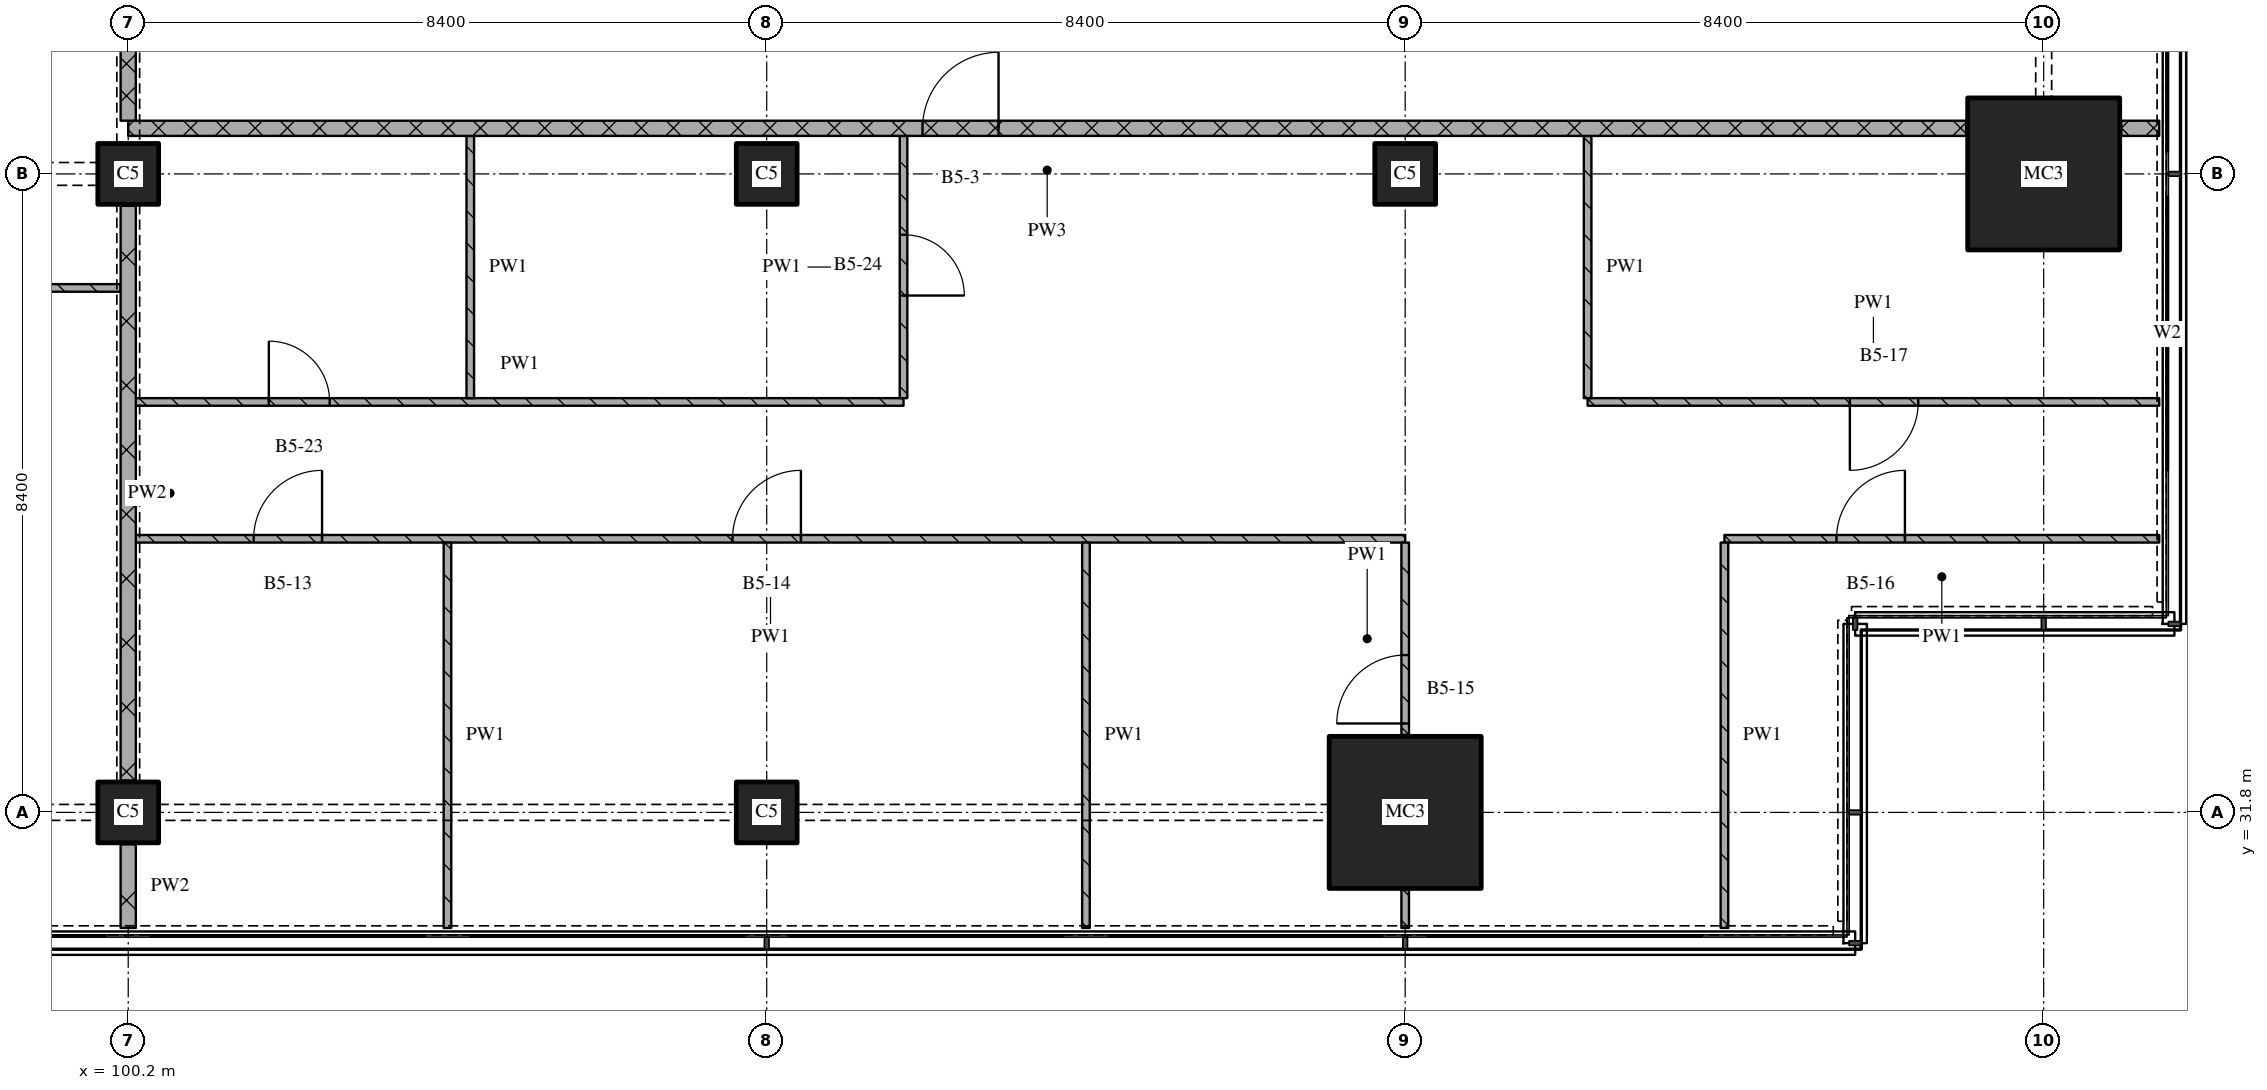
"""IFC4 building model, lengths in metres.
Left out: names, types, materials, properties, quantities, classifications, styles, units other than length and angle.
Written with IfcOpenShell. Run it as: python <this file> out.ifc"""

import sys

from ifc_helpers import new_model, si_unit, direction, frame, frame_2d, origin, origin_2d, place, context, subcontext, project, spatial, rectangle, extrude, element, fill, save


model = new_model("IFC4")
c1 = context("Model", 3, precision=1e-05, world=origin(), true_north=direction((0.0, 1.0)))
c2 = subcontext(c1, "Body", "Model", "MODEL_VIEW")
j1 = project(units=[si_unit("LENGTHUNIT", "METRE"), si_unit("PLANEANGLEUNIT", "RADIAN")], contexts=[c1])
p1 = place(None, origin())
s1 = spatial("IfcSite", under=j1, at=p1, CompositionType="ELEMENT")
p2 = place(p1, origin())
s2 = spatial("IfcBuilding", under=s1, at=p2, CompositionType="ELEMENT")
p3 = place(p2, frame((0.0, 0.0, 138.45)))
s3 = spatial("IfcBuildingStorey", under=s2, at=p3, CompositionType="ELEMENT", Elevation=138.45)
for number, where, z_axis, x_axis in (
    (1, (100.2, 31.8, 0.0), (0.0, 0.0, 1.0), (1.0, 0.0, 0.0)),
    (2, (100.2, 40.2, 0.0), (0.0, 0.0, 1.0), (1.0, 0.0, 0.0)),
    (3, (108.6, 31.8, 0.0), (0.0, 0.0, 1.0), (1.0, 0.0, 0.0)),
    (4, (108.6, 40.2, 0.0), (0.0, 0.0, 1.0), (1.0, 0.0, 0.0)),
):
    element("IfcColumn", number, at=place(p3, frame(where, z_axis=z_axis, x_axis=x_axis)), inside=s3, PredefinedType="COLUMN", context=c2, shape_type="SweptSolid", body=[
        extrude(rectangle(XDim=0.8, YDim=0.8, at=origin_2d()), origin(), (0.0, 0.0, 1.0), 3.6),
    ])
p4 = place(p3, frame((117.0, 31.8, 0.0), z_axis=(0.0, 0.0, 1.0), x_axis=(1.0, 0.0, 0.0)))
e5 = element("IfcColumn", 5, at=p4, inside=s3, PredefinedType="COLUMN", context=c2, shape_type="SweptSolid", body=[
    extrude(rectangle(XDim=2.0, YDim=2.0, at=origin_2d()), origin(), (0.0, 0.0, 1.0), 3.6),
])
p5 = place(p3, frame((117.0, 40.2, 0.0), z_axis=(0.0, 0.0, 1.0), x_axis=(1.0, 0.0, 0.0)))
e6 = element("IfcColumn", 6, at=p5, inside=s3, PredefinedType="COLUMN", context=c2, shape_type="SweptSolid", body=[
    extrude(rectangle(XDim=0.8, YDim=0.8, at=origin_2d()), origin(), (0.0, 0.0, 1.0), 3.6),
])
p6 = place(p3, frame((125.4, 40.2, 0.0), z_axis=(0.0, 0.0, 1.0), x_axis=(1.0, 0.0, 0.0)))
e7 = element("IfcColumn", 7, at=p6, inside=s3, PredefinedType="COLUMN", context=c2, shape_type="SweptSolid", body=[
    extrude(rectangle(XDim=2.0, YDim=2.0, at=origin_2d()), origin(), (0.0, 0.0, 1.0), 3.6),
])
p7 = place(p3, frame((117.0, 35.4, 0.0), z_axis=(0.0, 0.0, 1.0), x_axis=(-1.0, 0.0, 0.0)))
e8 = element("IfcWall", 8, at=p7, inside=s3, PredefinedType="PARTITIONING", context=c2, shape_type="SweptSolid", body=[
    extrude(rectangle(XDim=16.7, YDim=0.1, at=frame_2d((8.35, 0.0))), origin(), (0.0, 0.0, 1.0), 3.3),
])
p8 = place(p7, frame((7.95, 0.0, 0.0)))
e9 = element("IfcOpeningElement", 9, at=p8, cuts=e8, PredefinedType="OPENING", context=c2, shape_type="SweptSolid", body=[
    extrude(rectangle(XDim=0.9, YDim=2.1, at=frame_2d((0.45, 1.05))), frame((0.0, 0.06, 0.0), z_axis=(0.0, -1.0, 0.0), x_axis=(1.0, 0.0, 0.0)), (0.0, 0.0, 1.0), 0.12),
])
p9 = place(p7, frame((14.25, 0.0, 0.0)))
e10 = element("IfcOpeningElement", 10, at=p9, cuts=e8, PredefinedType="OPENING", context=c2, shape_type="SweptSolid", body=[
    extrude(rectangle(XDim=0.9, YDim=2.1, at=frame_2d((0.45, 1.05))), frame((0.0, 0.06, 0.0), z_axis=(0.0, -1.0, 0.0), x_axis=(1.0, 0.0, 0.0)), (0.0, 0.0, 1.0), 0.12),
])
p10 = place(p3, frame((126.92, 35.4, 0.0), z_axis=(0.0, 0.0, 1.0), x_axis=(-1.0, 0.0, 0.0)))
e11 = element("IfcWall", 11, at=p10, inside=s3, PredefinedType="PARTITIONING", context=c2, shape_type="SweptSolid", body=[
    extrude(rectangle(XDim=5.72, YDim=0.1, at=frame_2d((2.86, 0.0))), origin(), (0.0, 0.0, 1.0), 3.3),
])
p11 = place(p10, frame((3.346, 0.0, 0.0)))
e12 = element("IfcOpeningElement", 12, at=p11, cuts=e11, PredefinedType="OPENING", context=c2, shape_type="SweptSolid", body=[
    extrude(rectangle(XDim=0.9, YDim=2.1, at=frame_2d((0.45, 1.05))), frame((0.0, 0.06, 0.0), z_axis=(0.0, -1.0, 0.0), x_axis=(1.0, 0.0, 0.0)), (0.0, 0.0, 1.0), 0.12),
])
p12 = place(p3, frame((100.3, 37.2, 0.0), z_axis=(0.0, 0.0, 1.0), x_axis=(1.0, 0.0, 0.0)))
e13 = element("IfcWall", 13, at=p12, inside=s3, PredefinedType="PARTITIONING", context=c2, shape_type="SweptSolid", body=[
    extrude(rectangle(XDim=10.1, YDim=0.1, at=frame_2d((5.05, 0.0))), origin(), (0.0, 0.0, 1.0), 3.3),
])
p13 = place(p12, frame((1.75, 0.0, 0.0)))
e14 = element("IfcOpeningElement", 14, at=p13, cuts=e13, PredefinedType="OPENING", context=c2, shape_type="SweptSolid", body=[
    extrude(rectangle(XDim=0.8, YDim=2.1, at=frame_2d((0.4, 1.05))), frame((0.0, 0.06, 0.0), z_axis=(0.0, -1.0, 0.0), x_axis=(1.0, 0.0, 0.0)), (0.0, 0.0, 1.0), 0.12),
])
p14 = place(p3, frame((119.4, 37.2, 0.0), z_axis=(0.0, 0.0, 1.0), x_axis=(1.0, 0.0, 0.0)))
e15 = element("IfcWall", 15, at=p14, inside=s3, PredefinedType="PARTITIONING", context=c2, shape_type="SweptSolid", body=[
    extrude(rectangle(XDim=7.52, YDim=0.1, at=frame_2d((3.76, 0.0))), origin(), (0.0, 0.0, 1.0), 3.3),
])
p15 = place(p14, frame((3.45, 0.0, 0.0)))
e16 = element("IfcOpeningElement", 16, at=p15, cuts=e15, PredefinedType="OPENING", context=c2, shape_type="SweptSolid", body=[
    extrude(rectangle(XDim=0.9, YDim=2.1, at=frame_2d((0.45, 1.05))), frame((0.0, 0.06, 0.0), z_axis=(0.0, -1.0, 0.0), x_axis=(1.0, 0.0, 0.0)), (0.0, 0.0, 1.0), 0.12),
])
p16 = place(p3, frame((90.3, 38.7, 0.0), z_axis=(0.0, 0.0, 1.0), x_axis=(1.0, 0.0, 0.0)))
e17 = element("IfcWall", 17, at=p16, inside=s3, PredefinedType="PARTITIONING", context=c2, shape_type="SweptSolid", body=[
    extrude(rectangle(XDim=9.8, YDim=0.1, at=frame_2d((4.9, 0.0))), origin(), (0.0, 0.0, 1.0), 3.3),
])
p17 = place(p16, frame((6.8, 0.0, 0.0)))
e18 = element("IfcOpeningElement", 18, at=p17, cuts=e17, PredefinedType="OPENING", context=c2, shape_type="SweptSolid", body=[
    extrude(rectangle(XDim=0.8, YDim=2.1, at=frame_2d((0.4, 1.05))), frame((0.0, 0.06, 0.0), z_axis=(0.0, -1.0, 0.0), x_axis=(1.0, 0.0, 0.0)), (0.0, 0.0, 1.0), 0.12),
])
p18 = place(p3, frame((124.38, 40.8, 0.0), z_axis=(0.0, 0.0, 1.0), x_axis=(-1.0, 0.0, 0.0)))
e19 = element("IfcWall", 19, at=p18, inside=s3, PredefinedType="PARTITIONING", context=c2, shape_type="SweptSolid", body=[
    extrude(rectangle(XDim=24.18, YDim=0.2, at=frame_2d((12.09, 0.0))), origin(), (0.0, 0.0, 1.0), 3.3),
])
p19 = place(p18, frame((12.73, 0.0, 0.0)))
e20 = element("IfcOpeningElement", 20, at=p19, cuts=e19, PredefinedType="OPENING", context=c2, shape_type="SweptSolid", body=[
    extrude(rectangle(XDim=1.0, YDim=2.1, at=frame_2d((0.5, 1.05))), frame((0.0, 0.11, 0.0), z_axis=(0.0, -1.0, 0.0), x_axis=(1.0, 0.0, 0.0)), (0.0, 0.0, 1.0), 0.22),
])
p20 = place(p3, frame((126.42, 40.8, 0.0), z_axis=(0.0, 0.0, 1.0), x_axis=(1.0, 0.0, 0.0)))
e21 = element("IfcWall", 21, at=p20, inside=s3, PredefinedType="PARTITIONING", context=c2, shape_type="SweptSolid", body=[
    extrude(rectangle(XDim=0.5, YDim=0.2, at=frame_2d((0.25, 0.0))), origin(), (0.0, 0.0, 1.0), 3.3),
])
p21 = place(p3, frame((100.2, 43.1, 0.0), z_axis=(0.0, 0.0, 1.0), x_axis=(0.0, -1.0, 0.0)))
e22 = element("IfcWall", 22, at=p21, inside=s3, PredefinedType="PARTITIONING", context=c2, shape_type="SweptSolid", body=[
    extrude(rectangle(XDim=2.2, YDim=0.2, at=frame_2d((1.1, 0.0))), origin(), (0.0, 0.0, 1.0), 2.41),
])
p22 = place(p3, frame((100.2, 31.38, 0.0), z_axis=(0.0, 0.0, 1.0), x_axis=(0.0, -1.0, 0.0)))
e23 = element("IfcWall", 23, at=p22, inside=s3, PredefinedType="PARTITIONING", context=c2, shape_type="SweptSolid", body=[
    extrude(rectangle(XDim=1.1, YDim=0.2, at=frame_2d((0.55, 0.0))), origin(), (0.0, 0.0, 1.0), 3.3),
])
p23 = place(p3, frame((100.2, 39.78, 0.0), z_axis=(0.0, 0.0, 1.0), x_axis=(0.0, -1.0, 0.0)))
e24 = element("IfcWall", 24, at=p23, inside=s3, PredefinedType="PARTITIONING", context=c2, shape_type="SweptSolid", body=[
    extrude(rectangle(XDim=7.56, YDim=0.2, at=frame_2d((3.78, 0.0))), origin(), (0.0, 0.0, 1.0), 2.81),
])
p24 = place(p3, frame((104.4, 35.35, 0.0), z_axis=(0.0, 0.0, 1.0), x_axis=(0.0, -1.0, 0.0)))
e25 = element("IfcWall", 25, at=p24, inside=s3, PredefinedType="PARTITIONING", context=c2, shape_type="SweptSolid", body=[
    extrude(rectangle(XDim=5.07, YDim=0.1, at=frame_2d((2.535, 0.0))), origin(), (0.0, 0.0, 1.0), 3.3),
])
p25 = place(p3, frame((104.7, 40.7, 0.0), z_axis=(0.0, 0.0, 1.0), x_axis=(0.0, -1.0, 0.0)))
e26 = element("IfcWall", 26, at=p25, inside=s3, PredefinedType="PARTITIONING", context=c2, shape_type="SweptSolid", body=[
    extrude(rectangle(XDim=3.45, YDim=0.1, at=frame_2d((1.725, 0.0))), origin(), (0.0, 0.0, 1.0), 3.3),
])
p26 = place(p3, frame((110.4, 37.25, 0.0), z_axis=(0.0, 0.0, 1.0), x_axis=(0.0, 1.0, 0.0)))
e27 = element("IfcWall", 27, at=p26, inside=s3, PredefinedType="PARTITIONING", context=c2, shape_type="SweptSolid", body=[
    extrude(rectangle(XDim=3.45, YDim=0.1, at=frame_2d((1.725, 0.0))), origin(), (0.0, 0.0, 1.0), 3.3),
])
p27 = place(p26, frame((1.35, 0.0, 0.0)))
e28 = element("IfcOpeningElement", 28, at=p27, cuts=e27, PredefinedType="OPENING", context=c2, shape_type="SweptSolid", body=[
    extrude(rectangle(XDim=0.8, YDim=2.1, at=frame_2d((0.4, 1.05))), frame((0.0, 0.06, 0.0), z_axis=(0.0, -1.0, 0.0), x_axis=(1.0, 0.0, 0.0)), (0.0, 0.0, 1.0), 0.12),
])
p28 = place(p3, frame((112.8, 35.35, 0.0), z_axis=(0.0, 0.0, 1.0), x_axis=(0.0, -1.0, 0.0)))
e29 = element("IfcWall", 29, at=p28, inside=s3, PredefinedType="PARTITIONING", context=c2, shape_type="SweptSolid", body=[
    extrude(rectangle(XDim=5.07, YDim=0.1, at=frame_2d((2.535, 0.0))), origin(), (0.0, 0.0, 1.0), 3.3),
])
p29 = place(p3, frame((117.0, 30.78, 0.0), z_axis=(0.0, 0.0, 1.0), x_axis=(0.0, -1.0, 0.0)))
e30 = element("IfcWall", 30, at=p29, inside=s3, PredefinedType="PARTITIONING", context=c2, shape_type="SweptSolid", body=[
    extrude(rectangle(XDim=0.5, YDim=0.1, at=frame_2d((0.25, 0.0))), origin(), (0.0, 0.0, 1.0), 3.3),
])
p30 = place(p3, frame((117.0, 32.82, 0.0), z_axis=(0.0, 0.0, 1.0), x_axis=(0.0, 1.0, 0.0)))
e31 = element("IfcWall", 31, at=p30, inside=s3, PredefinedType="PARTITIONING", context=c2, shape_type="SweptSolid", body=[
    extrude(rectangle(XDim=2.53, YDim=0.1, at=frame_2d((1.265, 0.0))), origin(), (0.0, 0.0, 1.0), 3.3),
])
p31 = place(p30, frame((0.15, 0.0, 0.0)))
e32 = element("IfcOpeningElement", 32, at=p31, cuts=e31, PredefinedType="OPENING", context=c2, shape_type="SweptSolid", body=[
    extrude(rectangle(XDim=0.9, YDim=2.1, at=frame_2d((0.45, 1.05))), frame((0.0, 0.06, 0.0), z_axis=(0.0, -1.0, 0.0), x_axis=(1.0, 0.0, 0.0)), (0.0, 0.0, 1.0), 0.12),
])
p32 = place(p3, frame((119.4, 40.7, 0.0), z_axis=(0.0, 0.0, 1.0), x_axis=(0.0, -1.0, 0.0)))
e33 = element("IfcWall", 33, at=p32, inside=s3, PredefinedType="PARTITIONING", context=c2, shape_type="SweptSolid", body=[
    extrude(rectangle(XDim=3.45, YDim=0.1, at=frame_2d((1.725, 0.0))), origin(), (0.0, 0.0, 1.0), 3.3),
])
p33 = place(p3, frame((121.2, 35.35, 0.0), z_axis=(0.0, 0.0, 1.0), x_axis=(0.0, -1.0, 0.0)))
e34 = element("IfcWall", 34, at=p33, inside=s3, PredefinedType="PARTITIONING", context=c2, shape_type="SweptSolid", body=[
    extrude(rectangle(XDim=5.07, YDim=0.1, at=frame_2d((2.535, 0.0))), origin(), (0.0, 0.0, 1.0), 3.3),
])
p34 = place(p8, origin())
e35 = element("IfcDoor", 35, at=p34, inside=s3, OperationType="SINGLE_SWING_RIGHT", PredefinedType="DOOR", context=c2, shape_type="SweptSolid", body=[
    extrude(rectangle(XDim=0.9, YDim=2.1, at=frame_2d((0.45, 1.05))), frame((0.0, 0.025, 0.0), z_axis=(0.0, -1.0, 0.0), x_axis=(1.0, 0.0, 0.0)), (0.0, 0.0, 1.0), 0.05),
])
fill(e9, e35)
p35 = place(p9, origin())
e36 = element("IfcDoor", 36, at=p35, inside=s3, OperationType="SINGLE_SWING_RIGHT", PredefinedType="DOOR", context=c2, shape_type="SweptSolid", body=[
    extrude(rectangle(XDim=0.9, YDim=2.1, at=frame_2d((0.45, 1.05))), frame((0.0, 0.025, 0.0), z_axis=(0.0, -1.0, 0.0), x_axis=(1.0, 0.0, 0.0)), (0.0, 0.0, 1.0), 0.05),
])
fill(e10, e36)
p36 = place(p11, origin())
e37 = element("IfcDoor", 37, at=p36, inside=s3, OperationType="SINGLE_SWING_RIGHT", PredefinedType="DOOR", context=c2, shape_type="SweptSolid", body=[
    extrude(rectangle(XDim=0.9, YDim=2.1, at=frame_2d((0.45, 1.05))), frame((0.0, 0.025, 0.0), z_axis=(0.0, -1.0, 0.0), x_axis=(1.0, 0.0, 0.0)), (0.0, 0.0, 1.0), 0.05),
])
fill(e12, e37)
p37 = place(p13, origin())
e38 = element("IfcDoor", 38, at=p37, inside=s3, OperationType="SINGLE_SWING_LEFT", PredefinedType="DOOR", context=c2, shape_type="SweptSolid", body=[
    extrude(rectangle(XDim=0.8, YDim=2.1, at=frame_2d((0.4, 1.05))), frame((0.0, 0.025, 0.0), z_axis=(0.0, -1.0, 0.0), x_axis=(1.0, 0.0, 0.0)), (0.0, 0.0, 1.0), 0.05),
])
fill(e14, e38)
p38 = place(p15, origin())
e39 = element("IfcDoor", 39, at=p38, inside=s3, OperationType="SINGLE_SWING_RIGHT", PredefinedType="DOOR", context=c2, shape_type="SweptSolid", body=[
    extrude(rectangle(XDim=0.9, YDim=2.1, at=frame_2d((0.45, 1.05))), frame((0.0, 0.025, 0.0), z_axis=(0.0, -1.0, 0.0), x_axis=(1.0, 0.0, 0.0)), (0.0, 0.0, 1.0), 0.05),
])
fill(e16, e39)
p39 = place(p19, origin())
e40 = element("IfcDoor", 40, at=p39, inside=s3, OperationType="SINGLE_SWING_RIGHT", PredefinedType="DOOR", context=c2, shape_type="SweptSolid", body=[
    extrude(rectangle(XDim=1.0, YDim=2.1, at=frame_2d((0.5, 1.05))), frame((0.0, 0.025, 0.0), z_axis=(0.0, -1.0, 0.0), x_axis=(1.0, 0.0, 0.0)), (0.0, 0.0, 1.0), 0.05),
])
fill(e20, e40)
p40 = place(p27, origin())
e41 = element("IfcDoor", 41, at=p40, inside=s3, OperationType="SINGLE_SWING_RIGHT", PredefinedType="DOOR", context=c2, shape_type="SweptSolid", body=[
    extrude(rectangle(XDim=0.8, YDim=2.1, at=frame_2d((0.4, 1.05))), frame((0.0, 0.025, 0.0), z_axis=(0.0, -1.0, 0.0), x_axis=(1.0, 0.0, 0.0)), (0.0, 0.0, 1.0), 0.05),
])
fill(e28, e41)
p41 = place(p31, origin())
e42 = element("IfcDoor", 42, at=p41, inside=s3, OperationType="SINGLE_SWING_LEFT", PredefinedType="DOOR", context=c2, shape_type="SweptSolid", body=[
    extrude(rectangle(XDim=0.9, YDim=2.1, at=frame_2d((0.45, 1.05))), frame((0.0, 0.025, 0.0), z_axis=(0.0, -1.0, 0.0), x_axis=(1.0, 0.0, 0.0)), (0.0, 0.0, 1.0), 0.05),
])
fill(e32, e42)
save(model, sys.argv[1])
